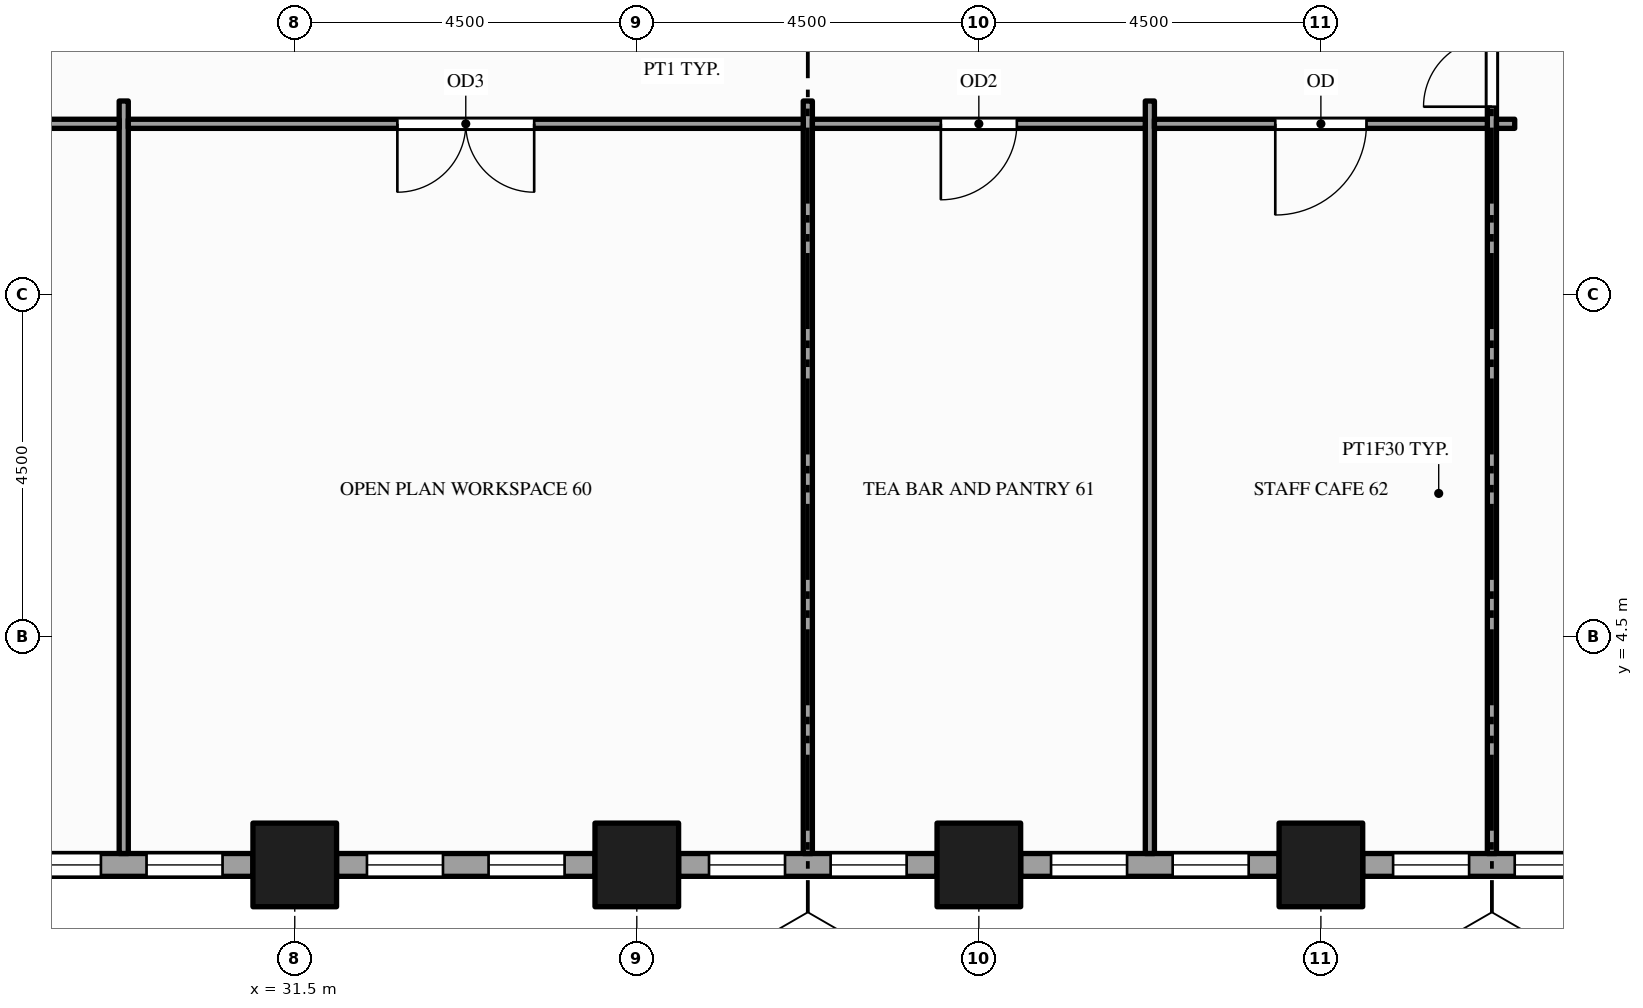
"""IFC4 building model, lengths in metres.
Left out: names, types, materials, properties, quantities, classifications, styles, units other than length and angle.
Written with IfcOpenShell. Run it as: python <this file> out.ifc"""

import sys

from ifc_helpers import new_model, si_unit, direction, frame, frame_2d, origin, origin_2d, place, context, subcontext, project, spatial, rectangle, hollow_rectangle, extrude, element, fill, save


model = new_model("IFC4")
c1 = context("Model", 3, precision=1e-05, world=origin(), true_north=direction((0.0, 1.0)))
c2 = subcontext(c1, "Body", "Model", "MODEL_VIEW")
j1 = project(units=[si_unit("LENGTHUNIT", "METRE"), si_unit("PLANEANGLEUNIT", "RADIAN")], contexts=[c1])
p1 = place(None, origin())
s1 = spatial("IfcSite", under=j1, at=p1, CompositionType="ELEMENT")
p2 = place(p1, origin())
s2 = spatial("IfcBuilding", under=s1, at=p2, CompositionType="ELEMENT")
p3 = place(p2, frame((0.0, 0.0, 45.0)))
s3 = spatial("IfcBuildingStorey", under=s2, at=p3, CompositionType="ELEMENT", Elevation=45.0)
for number, where, z_axis, x_axis in (
    (1, (31.5, 1.5, -0.15), (0.0, 0.0, 1.0), (1.0, 0.0, 0.0)),
    (2, (36.0, 1.5, -0.15), (0.0, 0.0, 1.0), (1.0, 0.0, 0.0)),
    (3, (40.5, 1.5, -0.15), (0.0, 0.0, 1.0), (1.0, 0.0, 0.0)),
    (4, (45.0, 1.5, -0.15), (0.0, 0.0, 1.0), (1.0, 0.0, 0.0)),
):
    element("IfcColumn", number, at=place(p3, frame(where, z_axis=z_axis, x_axis=x_axis)), inside=s3, PredefinedType="COLUMN", context=c2, shape_type="SweptSolid", body=[
        extrude(hollow_rectangle(XDim=1.1, YDim=1.1, WallThickness=0.06, at=origin_2d()), origin(), (0.0, 0.0, 1.0), 4.0),
    ])
p4 = place(p3, frame((27.55, 1.5, 0.0), z_axis=(0.0, 0.0, 1.0), x_axis=(1.0, 0.0, 0.0)))
e5 = element("IfcWall", 5, at=p4, inside=s3, PredefinedType="STANDARD", context=c2, shape_type="SweptSolid", body=[
    extrude(rectangle(XDim=3.4, YDim=0.3, at=frame_2d((1.7, 0.0))), origin(), (0.0, 0.0, 1.0), 3.144),
])
p5 = place(p4, frame((0.4, 0.0, 0.9)))
e6 = element("IfcOpeningElement", 6, at=p5, cuts=e5, PredefinedType="OPENING", context=c2, shape_type="SweptSolid", body=[
    extrude(rectangle(XDim=1.0, YDim=2.0, at=frame_2d((0.5, 1.0))), frame((0.0, 0.16, 0.0), z_axis=(0.0, -1.0, 0.0), x_axis=(1.0, 0.0, 0.0)), (0.0, 0.0, 1.0), 0.32),
])
p6 = place(p4, frame((2.0, 0.0, 0.9)))
e7 = element("IfcOpeningElement", 7, at=p6, cuts=e5, PredefinedType="OPENING", context=c2, shape_type="SweptSolid", body=[
    extrude(rectangle(XDim=1.0, YDim=2.0, at=frame_2d((0.5, 1.0))), frame((0.0, 0.16, 0.0), z_axis=(0.0, -1.0, 0.0), x_axis=(1.0, 0.0, 0.0)), (0.0, 0.0, 1.0), 0.32),
])
p7 = place(p3, frame((32.05, 1.5, 0.0), z_axis=(0.0, 0.0, 1.0), x_axis=(1.0, 0.0, 0.0)))
e8 = element("IfcWall", 8, at=p7, inside=s3, PredefinedType="STANDARD", context=c2, shape_type="SweptSolid", body=[
    extrude(rectangle(XDim=3.4, YDim=0.3, at=frame_2d((1.7, 0.0))), origin(), (0.0, 0.0, 1.0), 3.144),
])
p8 = place(p7, frame((0.4, 0.0, 0.9)))
e9 = element("IfcOpeningElement", 9, at=p8, cuts=e8, PredefinedType="OPENING", context=c2, shape_type="SweptSolid", body=[
    extrude(rectangle(XDim=1.0, YDim=2.0, at=frame_2d((0.5, 1.0))), frame((0.0, 0.16, 0.0), z_axis=(0.0, -1.0, 0.0), x_axis=(1.0, 0.0, 0.0)), (0.0, 0.0, 1.0), 0.32),
])
p9 = place(p7, frame((2.0, 0.0, 0.9)))
e10 = element("IfcOpeningElement", 10, at=p9, cuts=e8, PredefinedType="OPENING", context=c2, shape_type="SweptSolid", body=[
    extrude(rectangle(XDim=1.0, YDim=2.0, at=frame_2d((0.5, 1.0))), frame((0.0, 0.16, 0.0), z_axis=(0.0, -1.0, 0.0), x_axis=(1.0, 0.0, 0.0)), (0.0, 0.0, 1.0), 0.32),
])
p10 = place(p3, frame((36.55, 1.5, 0.0), z_axis=(0.0, 0.0, 1.0), x_axis=(1.0, 0.0, 0.0)))
e11 = element("IfcWall", 11, at=p10, inside=s3, PredefinedType="STANDARD", context=c2, shape_type="SweptSolid", body=[
    extrude(rectangle(XDim=3.4, YDim=0.3, at=frame_2d((1.7, 0.0))), origin(), (0.0, 0.0, 1.0), 3.144),
])
p11 = place(p10, frame((0.4, 0.0, 0.9)))
e12 = element("IfcOpeningElement", 12, at=p11, cuts=e11, PredefinedType="OPENING", context=c2, shape_type="SweptSolid", body=[
    extrude(rectangle(XDim=1.0, YDim=2.0, at=frame_2d((0.5, 1.0))), frame((0.0, 0.16, 0.0), z_axis=(0.0, -1.0, 0.0), x_axis=(1.0, 0.0, 0.0)), (0.0, 0.0, 1.0), 0.32),
])
p12 = place(p10, frame((2.0, 0.0, 0.9)))
e13 = element("IfcOpeningElement", 13, at=p12, cuts=e11, PredefinedType="OPENING", context=c2, shape_type="SweptSolid", body=[
    extrude(rectangle(XDim=1.0, YDim=2.0, at=frame_2d((0.5, 1.0))), frame((0.0, 0.16, 0.0), z_axis=(0.0, -1.0, 0.0), x_axis=(1.0, 0.0, 0.0)), (0.0, 0.0, 1.0), 0.32),
])
p13 = place(p3, frame((41.05, 1.5, 0.0), z_axis=(0.0, 0.0, 1.0), x_axis=(1.0, 0.0, 0.0)))
e14 = element("IfcWall", 14, at=p13, inside=s3, PredefinedType="STANDARD", context=c2, shape_type="SweptSolid", body=[
    extrude(rectangle(XDim=3.4, YDim=0.3, at=frame_2d((1.7, 0.0))), origin(), (0.0, 0.0, 1.0), 3.144),
])
p14 = place(p13, frame((0.4, 0.0, 0.9)))
e15 = element("IfcOpeningElement", 15, at=p14, cuts=e14, PredefinedType="OPENING", context=c2, shape_type="SweptSolid", body=[
    extrude(rectangle(XDim=1.0, YDim=2.0, at=frame_2d((0.5, 1.0))), frame((0.0, 0.16, 0.0), z_axis=(0.0, -1.0, 0.0), x_axis=(1.0, 0.0, 0.0)), (0.0, 0.0, 1.0), 0.32),
])
p15 = place(p13, frame((2.0, 0.0, 0.9)))
e16 = element("IfcOpeningElement", 16, at=p15, cuts=e14, PredefinedType="OPENING", context=c2, shape_type="SweptSolid", body=[
    extrude(rectangle(XDim=1.0, YDim=2.0, at=frame_2d((0.5, 1.0))), frame((0.0, 0.16, 0.0), z_axis=(0.0, -1.0, 0.0), x_axis=(1.0, 0.0, 0.0)), (0.0, 0.0, 1.0), 0.32),
])
p16 = place(p3, frame((45.55, 1.5, 0.0), z_axis=(0.0, 0.0, 1.0), x_axis=(1.0, 0.0, 0.0)))
e17 = element("IfcWall", 17, at=p16, inside=s3, PredefinedType="STANDARD", context=c2, shape_type="SweptSolid", body=[
    extrude(rectangle(XDim=3.4, YDim=0.3, at=frame_2d((1.7, 0.0))), origin(), (0.0, 0.0, 1.0), 3.144),
])
p17 = place(p16, frame((0.4, 0.0, 0.9)))
e18 = element("IfcOpeningElement", 18, at=p17, cuts=e17, PredefinedType="OPENING", context=c2, shape_type="SweptSolid", body=[
    extrude(rectangle(XDim=1.0, YDim=2.0, at=frame_2d((0.5, 1.0))), frame((0.0, 0.16, 0.0), z_axis=(0.0, -1.0, 0.0), x_axis=(1.0, 0.0, 0.0)), (0.0, 0.0, 1.0), 0.32),
])
p18 = place(p16, frame((2.0, 0.0, 0.9)))
e19 = element("IfcOpeningElement", 19, at=p18, cuts=e17, PredefinedType="OPENING", context=c2, shape_type="SweptSolid", body=[
    extrude(rectangle(XDim=1.0, YDim=2.0, at=frame_2d((0.5, 1.0))), frame((0.0, 0.16, 0.0), z_axis=(0.0, -1.0, 0.0), x_axis=(1.0, 0.0, 0.0)), (0.0, 0.0, 1.0), 0.32),
])
for number, where, z_axis, x_axis in (
    (20, (29.25, 1.65, 0.0), (0.0, 0.0, 1.0), (0.0, 1.0, 0.0)),
    (21, (38.25, 1.65, 0.0), (0.0, 0.0, 1.0), (0.0, 1.0, 0.0)),
    (22, (42.75, 1.65, 0.0), (0.0, 0.0, 1.0), (0.0, 1.0, 0.0)),
):
    element("IfcWall", number, at=place(p3, frame(where, z_axis=z_axis, x_axis=x_axis)), inside=s3, PredefinedType="PARTITIONING", context=c2, shape_type="SweptSolid", body=[
        extrude(rectangle(XDim=9.9, YDim=0.12, at=frame_2d((4.95, 0.0))), origin(), (0.0, 0.0, 1.0), 2.938),
    ])
p19 = place(p3, frame((47.25, 1.65, 0.0), z_axis=(0.0, 0.0, 1.0), x_axis=(0.0, 1.0, 0.0)))
e23 = element("IfcWall", 23, at=p19, inside=s3, PredefinedType="PARTITIONING", context=c2, shape_type="SweptSolid", body=[
    extrude(rectangle(XDim=22.2, YDim=0.12, at=frame_2d((11.1, 0.0))), origin(), (0.0, 0.0, 1.0), 2.938),
])
p20 = place(p19, frame((9.825, 0.0, 0.0)))
e24 = element("IfcOpeningElement", 24, at=p20, cuts=e23, PredefinedType="OPENING", context=c2, shape_type="SweptSolid", body=[
    extrude(rectangle(XDim=1.8, YDim=2.1, at=frame_2d((0.9, 1.05))), frame((0.0, 0.07, 0.0), z_axis=(0.0, -1.0, 0.0), x_axis=(1.0, 0.0, 0.0)), (0.0, 0.0, 1.0), 0.14),
])
p21 = place(p19, frame((12.85, 0.0, 0.0)))
e25 = element("IfcOpeningElement", 25, at=p21, cuts=e23, PredefinedType="OPENING", context=c2, shape_type="SweptSolid", body=[
    extrude(rectangle(XDim=0.9, YDim=2.1, at=frame_2d((0.45, 1.05))), frame((0.0, 0.07, 0.0), z_axis=(0.0, -1.0, 0.0), x_axis=(1.0, 0.0, 0.0)), (0.0, 0.0, 1.0), 0.14),
])
p22 = place(p19, frame((16.65, 0.0, 0.0)))
e26 = element("IfcOpeningElement", 26, at=p22, cuts=e23, PredefinedType="OPENING", context=c2, shape_type="SweptSolid", body=[
    extrude(rectangle(XDim=0.9, YDim=2.1, at=frame_2d((0.45, 1.05))), frame((0.0, 0.07, 0.0), z_axis=(0.0, -1.0, 0.0), x_axis=(1.0, 0.0, 0.0)), (0.0, 0.0, 1.0), 0.14),
])
p23 = place(p19, frame((20.35, 0.0, 0.0)))
e27 = element("IfcOpeningElement", 27, at=p23, cuts=e23, PredefinedType="OPENING", context=c2, shape_type="SweptSolid", body=[
    extrude(rectangle(XDim=1.0, YDim=2.1, at=frame_2d((0.5, 1.05))), frame((0.0, 0.07, 0.0), z_axis=(0.0, -1.0, 0.0), x_axis=(1.0, 0.0, 0.0)), (0.0, 0.0, 1.0), 0.14),
])
p24 = place(p3, frame((24.81, 11.25, 0.0), z_axis=(0.0, 0.0, 1.0), x_axis=(1.0, 0.0, 0.0)))
e28 = element("IfcWall", 28, at=p24, inside=s3, PredefinedType="PARTITIONING", context=c2, shape_type="SweptSolid", body=[
    extrude(rectangle(XDim=4.38, YDim=0.12, at=frame_2d((2.19, 0.0))), origin(), (0.0, 0.0, 1.0), 2.938),
])
p25 = place(p24, frame((1.69, 0.0, 0.0)))
e29 = element("IfcOpeningElement", 29, at=p25, cuts=e28, PredefinedType="OPENING", context=c2, shape_type="SweptSolid", body=[
    extrude(rectangle(XDim=1.0, YDim=2.1, at=frame_2d((0.5, 1.05))), frame((0.0, 0.07, 0.0), z_axis=(0.0, -1.0, 0.0), x_axis=(1.0, 0.0, 0.0)), (0.0, 0.0, 1.0), 0.14),
])
p26 = place(p3, frame((29.31, 11.25, 0.0), z_axis=(0.0, 0.0, 1.0), x_axis=(1.0, 0.0, 0.0)))
e30 = element("IfcWall", 30, at=p26, inside=s3, PredefinedType="PARTITIONING", context=c2, shape_type="SweptSolid", body=[
    extrude(rectangle(XDim=8.88, YDim=0.12, at=frame_2d((4.44, 0.0))), origin(), (0.0, 0.0, 1.0), 2.938),
])
p27 = place(p26, frame((3.54, 0.0, 0.0)))
e31 = element("IfcOpeningElement", 31, at=p27, cuts=e30, PredefinedType="OPENING", context=c2, shape_type="SweptSolid", body=[
    extrude(rectangle(XDim=1.8, YDim=2.1, at=frame_2d((0.9, 1.05))), frame((0.0, 0.07, 0.0), z_axis=(0.0, -1.0, 0.0), x_axis=(1.0, 0.0, 0.0)), (0.0, 0.0, 1.0), 0.14),
])
p28 = place(p3, frame((38.31, 11.25, 0.0), z_axis=(0.0, 0.0, 1.0), x_axis=(1.0, 0.0, 0.0)))
e32 = element("IfcWall", 32, at=p28, inside=s3, PredefinedType="PARTITIONING", context=c2, shape_type="SweptSolid", body=[
    extrude(rectangle(XDim=4.38, YDim=0.12, at=frame_2d((2.19, 0.0))), origin(), (0.0, 0.0, 1.0), 2.938),
])
p29 = place(p28, frame((1.69, 0.0, 0.0)))
e33 = element("IfcOpeningElement", 33, at=p29, cuts=e32, PredefinedType="OPENING", context=c2, shape_type="SweptSolid", body=[
    extrude(rectangle(XDim=1.0, YDim=2.1, at=frame_2d((0.5, 1.05))), frame((0.0, 0.07, 0.0), z_axis=(0.0, -1.0, 0.0), x_axis=(1.0, 0.0, 0.0)), (0.0, 0.0, 1.0), 0.14),
])
p30 = place(p3, frame((42.81, 11.25, 0.0), z_axis=(0.0, 0.0, 1.0), x_axis=(1.0, 0.0, 0.0)))
e34 = element("IfcWall", 34, at=p30, inside=s3, PredefinedType="PARTITIONING", context=c2, shape_type="SweptSolid", body=[
    extrude(rectangle(XDim=4.38, YDim=0.12, at=frame_2d((2.19, 0.0))), origin(), (0.0, 0.0, 1.0), 2.938),
])
p31 = place(p30, frame((1.59, 0.0, 0.0)))
e35 = element("IfcOpeningElement", 35, at=p31, cuts=e34, PredefinedType="OPENING", context=c2, shape_type="SweptSolid", body=[
    extrude(rectangle(XDim=1.2, YDim=2.1, at=frame_2d((0.6, 1.05))), frame((0.0, 0.07, 0.0), z_axis=(0.0, -1.0, 0.0), x_axis=(1.0, 0.0, 0.0)), (0.0, 0.0, 1.0), 0.14),
])
p32 = place(p3, frame((47.31, 11.25, 0.0), z_axis=(0.0, 0.0, 1.0), x_axis=(1.0, 0.0, 0.0)))
e36 = element("IfcWall", 36, at=p32, inside=s3, PredefinedType="PARTITIONING", context=c2, shape_type="SweptSolid", body=[
    extrude(rectangle(XDim=0.24, YDim=0.12, at=frame_2d((0.12, 0.0))), origin(), (0.0, 0.0, 1.0), 2.938),
])
p33 = place(p5, origin())
e37 = element("IfcWindow", 37, at=p33, inside=s3, PartitioningType="SINGLE_PANEL", PredefinedType="WINDOW", context=c2, shape_type="SweptSolid", body=[
    extrude(rectangle(XDim=1.0, YDim=2.0, at=frame_2d((0.5, 1.0))), frame((0.0, 0.03, 0.0), z_axis=(0.0, -1.0, 0.0), x_axis=(1.0, 0.0, 0.0)), (0.0, 0.0, 1.0), 0.06),
])
fill(e6, e37)
p34 = place(p6, origin())
e38 = element("IfcWindow", 38, at=p34, inside=s3, PartitioningType="SINGLE_PANEL", PredefinedType="WINDOW", context=c2, shape_type="SweptSolid", body=[
    extrude(rectangle(XDim=1.0, YDim=2.0, at=frame_2d((0.5, 1.0))), frame((0.0, 0.03, 0.0), z_axis=(0.0, -1.0, 0.0), x_axis=(1.0, 0.0, 0.0)), (0.0, 0.0, 1.0), 0.06),
])
fill(e7, e38)
p35 = place(p8, origin())
e39 = element("IfcWindow", 39, at=p35, inside=s3, PartitioningType="SINGLE_PANEL", PredefinedType="WINDOW", context=c2, shape_type="SweptSolid", body=[
    extrude(rectangle(XDim=1.0, YDim=2.0, at=frame_2d((0.5, 1.0))), frame((0.0, 0.03, 0.0), z_axis=(0.0, -1.0, 0.0), x_axis=(1.0, 0.0, 0.0)), (0.0, 0.0, 1.0), 0.06),
])
fill(e9, e39)
p36 = place(p9, origin())
e40 = element("IfcWindow", 40, at=p36, inside=s3, PartitioningType="SINGLE_PANEL", PredefinedType="WINDOW", context=c2, shape_type="SweptSolid", body=[
    extrude(rectangle(XDim=1.0, YDim=2.0, at=frame_2d((0.5, 1.0))), frame((0.0, 0.03, 0.0), z_axis=(0.0, -1.0, 0.0), x_axis=(1.0, 0.0, 0.0)), (0.0, 0.0, 1.0), 0.06),
])
fill(e10, e40)
p37 = place(p11, origin())
e41 = element("IfcWindow", 41, at=p37, inside=s3, PartitioningType="SINGLE_PANEL", PredefinedType="WINDOW", context=c2, shape_type="SweptSolid", body=[
    extrude(rectangle(XDim=1.0, YDim=2.0, at=frame_2d((0.5, 1.0))), frame((0.0, 0.03, 0.0), z_axis=(0.0, -1.0, 0.0), x_axis=(1.0, 0.0, 0.0)), (0.0, 0.0, 1.0), 0.06),
])
fill(e12, e41)
p38 = place(p12, origin())
e42 = element("IfcWindow", 42, at=p38, inside=s3, PartitioningType="SINGLE_PANEL", PredefinedType="WINDOW", context=c2, shape_type="SweptSolid", body=[
    extrude(rectangle(XDim=1.0, YDim=2.0, at=frame_2d((0.5, 1.0))), frame((0.0, 0.03, 0.0), z_axis=(0.0, -1.0, 0.0), x_axis=(1.0, 0.0, 0.0)), (0.0, 0.0, 1.0), 0.06),
])
fill(e13, e42)
p39 = place(p14, origin())
e43 = element("IfcWindow", 43, at=p39, inside=s3, PartitioningType="SINGLE_PANEL", PredefinedType="WINDOW", context=c2, shape_type="SweptSolid", body=[
    extrude(rectangle(XDim=1.0, YDim=2.0, at=frame_2d((0.5, 1.0))), frame((0.0, 0.03, 0.0), z_axis=(0.0, -1.0, 0.0), x_axis=(1.0, 0.0, 0.0)), (0.0, 0.0, 1.0), 0.06),
])
fill(e15, e43)
p40 = place(p15, origin())
e44 = element("IfcWindow", 44, at=p40, inside=s3, PartitioningType="SINGLE_PANEL", PredefinedType="WINDOW", context=c2, shape_type="SweptSolid", body=[
    extrude(rectangle(XDim=1.0, YDim=2.0, at=frame_2d((0.5, 1.0))), frame((0.0, 0.03, 0.0), z_axis=(0.0, -1.0, 0.0), x_axis=(1.0, 0.0, 0.0)), (0.0, 0.0, 1.0), 0.06),
])
fill(e16, e44)
p41 = place(p17, origin())
e45 = element("IfcWindow", 45, at=p41, inside=s3, PartitioningType="SINGLE_PANEL", PredefinedType="WINDOW", context=c2, shape_type="SweptSolid", body=[
    extrude(rectangle(XDim=1.0, YDim=2.0, at=frame_2d((0.5, 1.0))), frame((0.0, 0.03, 0.0), z_axis=(0.0, -1.0, 0.0), x_axis=(1.0, 0.0, 0.0)), (0.0, 0.0, 1.0), 0.06),
])
fill(e18, e45)
p42 = place(p18, origin())
e46 = element("IfcWindow", 46, at=p42, inside=s3, PartitioningType="SINGLE_PANEL", PredefinedType="WINDOW", context=c2, shape_type="SweptSolid", body=[
    extrude(rectangle(XDim=1.0, YDim=2.0, at=frame_2d((0.5, 1.0))), frame((0.0, 0.03, 0.0), z_axis=(0.0, -1.0, 0.0), x_axis=(1.0, 0.0, 0.0)), (0.0, 0.0, 1.0), 0.06),
])
fill(e19, e46)
p43 = place(p20, origin())
e47 = element("IfcDoor", 47, at=p43, inside=s3, OperationType="DOUBLE_DOOR_SINGLE_SWING", PredefinedType="DOOR", context=c2, shape_type="SweptSolid", body=[
    extrude(rectangle(XDim=1.8, YDim=2.1, at=frame_2d((0.9, 1.05))), frame((0.0, 0.025, 0.0), z_axis=(0.0, -1.0, 0.0), x_axis=(1.0, 0.0, 0.0)), (0.0, 0.0, 1.0), 0.05),
])
fill(e24, e47)
p44 = place(p27, origin())
e48 = element("IfcDoor", 48, at=p44, inside=s3, OperationType="DOUBLE_DOOR_SINGLE_SWING", PredefinedType="DOOR", context=c2, shape_type="SweptSolid", body=[
    extrude(rectangle(XDim=1.8, YDim=2.1, at=frame_2d((0.9, 1.05))), frame((0.0, 0.025, 0.0), z_axis=(0.0, -1.0, 0.0), x_axis=(1.0, 0.0, 0.0)), (0.0, 0.0, 1.0), 0.05),
])
fill(e31, e48)
p45 = place(p29, origin())
e49 = element("IfcDoor", 49, at=p45, inside=s3, OperationType="SINGLE_SWING_LEFT", PredefinedType="DOOR", context=c2, shape_type="SweptSolid", body=[
    extrude(rectangle(XDim=1.0, YDim=2.1, at=frame_2d((0.5, 1.05))), frame((0.0, 0.025, 0.0), z_axis=(0.0, -1.0, 0.0), x_axis=(1.0, 0.0, 0.0)), (0.0, 0.0, 1.0), 0.05),
])
fill(e33, e49)
p46 = place(p31, origin())
e50 = element("IfcDoor", 50, at=p46, inside=s3, OperationType="SINGLE_SWING_LEFT", PredefinedType="DOOR", context=c2, shape_type="SweptSolid", body=[
    extrude(rectangle(XDim=1.2, YDim=2.1, at=frame_2d((0.6, 1.05))), frame((0.0, 0.025, 0.0), z_axis=(0.0, -1.0, 0.0), x_axis=(1.0, 0.0, 0.0)), (0.0, 0.0, 1.0), 0.05),
])
fill(e35, e50)
save(model, sys.argv[1])
